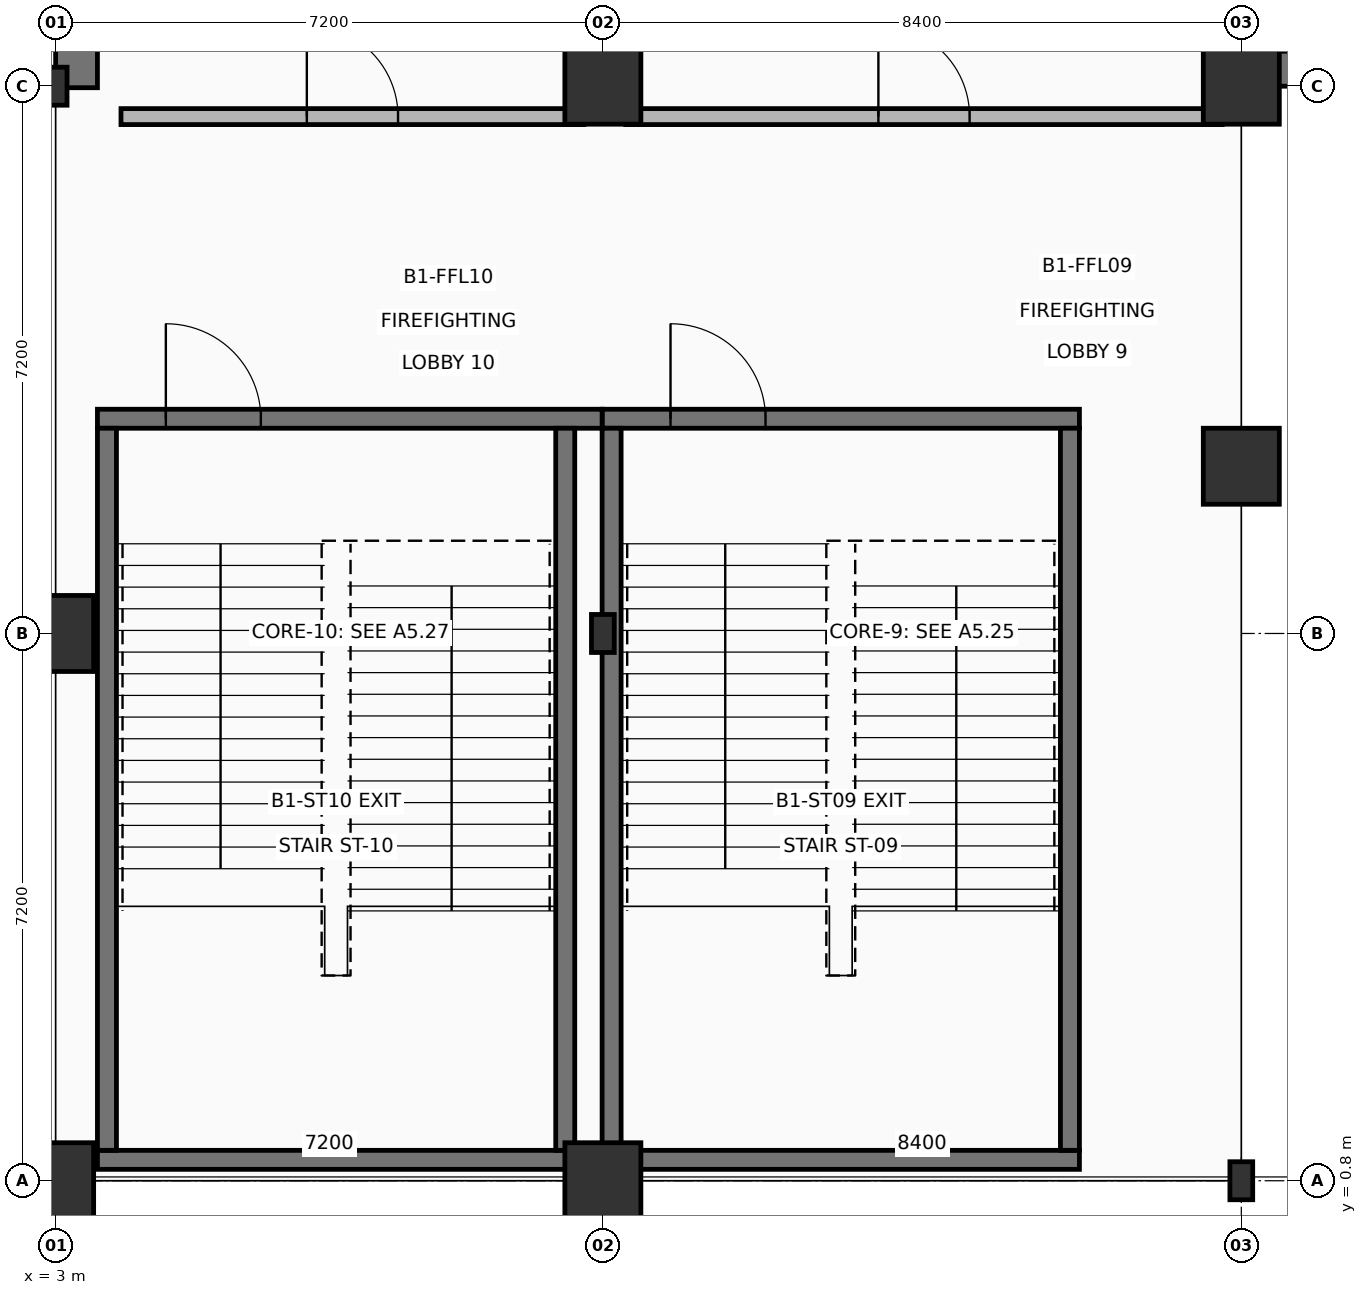
"""IFC4 building model, lengths in metres.
Left out: names, types, materials, properties, quantities, classifications, styles, units other than length and angle.
Written with IfcOpenShell. Run it as: python <this file> out.ifc"""

import sys

from ifc_helpers import new_model, si_unit, direction, frame, frame_2d, origin, origin_2d, place, context, subcontext, project, spatial, rectangle, hollow_rectangle, extrude, element, fill, save


model = new_model("IFC4")
c1 = context("Model", 3, precision=1e-05, world=origin(), true_north=direction((0.0, 1.0)))
c2 = subcontext(c1, "Body", "Model", "MODEL_VIEW")
j1 = project(units=[si_unit("LENGTHUNIT", "METRE"), si_unit("PLANEANGLEUNIT", "RADIAN")], contexts=[c1])
p1 = place(None, origin())
s1 = spatial("IfcSite", under=j1, at=p1, CompositionType="ELEMENT")
p2 = place(p1, origin())
s2 = spatial("IfcBuilding", under=s1, at=p2, CompositionType="ELEMENT")
p3 = place(p2, frame((0.0, 0.0, -5.4)))
s3 = spatial("IfcBuildingStorey", under=s2, at=p3, CompositionType="ELEMENT", Elevation=-5.4)
for number, where, z_axis, x_axis in (
    (1, (3.0, 0.8, 0.0), (0.0, 0.0, 1.0), (1.0, 0.0, 0.0)),
    (2, (3.0, 8.0, 0.0), (0.0, 0.0, 1.0), (1.0, 0.0, 0.0)),
):
    element("IfcColumn", number, at=place(p3, frame(where, z_axis=z_axis, x_axis=x_axis)), inside=s3, PredefinedType="COLUMN", context=c2, shape_type="SweptSolid", body=[
        extrude(rectangle(XDim=1.0, YDim=1.0, at=origin_2d()), origin(), (0.0, 0.0, 1.0), 5.4),
    ])
p4 = place(p3, frame((3.0, 15.2, 0.0), z_axis=(0.0, 0.0, 1.0), x_axis=(1.0, 0.0, 0.0)))
e3 = element("IfcColumn", 3, at=p4, inside=s3, PredefinedType="COLUMN", context=c2, shape_type="SweptSolid", body=[
    extrude(hollow_rectangle(XDim=0.3, YDim=0.5, WallThickness=0.016, at=origin_2d()), origin(), (0.0, 0.0, 1.0), 5.4),
])
p5 = place(p3, frame((10.2, 0.8, 0.0), z_axis=(0.0, 0.0, 1.0), x_axis=(1.0, 0.0, 0.0)))
e4 = element("IfcColumn", 4, at=p5, inside=s3, PredefinedType="COLUMN", context=c2, shape_type="SweptSolid", body=[
    extrude(rectangle(XDim=1.0, YDim=1.0, at=origin_2d()), origin(), (0.0, 0.0, 1.0), 5.4),
])
p6 = place(p3, frame((10.2, 8.0, 0.0), z_axis=(0.0, 0.0, 1.0), x_axis=(1.0, 0.0, 0.0)))
e5 = element("IfcColumn", 5, at=p6, inside=s3, PredefinedType="COLUMN", context=c2, shape_type="SweptSolid", body=[
    extrude(hollow_rectangle(XDim=0.3, YDim=0.5, WallThickness=0.016, at=origin_2d()), origin(), (0.0, 0.0, 1.0), 5.4),
])
p7 = place(p3, frame((10.2, 15.2, 0.0), z_axis=(0.0, 0.0, 1.0), x_axis=(1.0, 0.0, 0.0)))
e6 = element("IfcColumn", 6, at=p7, inside=s3, PredefinedType="COLUMN", context=c2, shape_type="SweptSolid", body=[
    extrude(rectangle(XDim=1.0, YDim=1.0, at=origin_2d()), origin(), (0.0, 0.0, 1.0), 5.4),
])
p8 = place(p3, frame((18.6, 0.8, 0.0), z_axis=(0.0, 0.0, 1.0), x_axis=(1.0, 0.0, 0.0)))
e7 = element("IfcColumn", 7, at=p8, inside=s3, PredefinedType="COLUMN", context=c2, shape_type="SweptSolid", body=[
    extrude(hollow_rectangle(XDim=0.3, YDim=0.5, WallThickness=0.016, at=origin_2d()), origin(), (0.0, 0.0, 1.0), 5.4),
])
p9 = place(p3, frame((18.6, 15.2, 0.0), z_axis=(0.0, 0.0, 1.0), x_axis=(1.0, 0.0, 0.0)))
e8 = element("IfcColumn", 8, at=p9, inside=s3, PredefinedType="COLUMN", context=c2, shape_type="SweptSolid", body=[
    extrude(rectangle(XDim=1.0, YDim=1.0, at=origin_2d()), origin(), (0.0, 0.0, 1.0), 5.4),
])
p10 = place(p3, frame((18.6, 10.2, 0.0), z_axis=(0.0, 0.0, 1.0), x_axis=(1.0, 0.0, 0.0)))
e9 = element("IfcColumn", 9, at=p10, inside=s3, PredefinedType="COLUMN", context=c2, shape_type="SweptSolid", body=[
    extrude(rectangle(XDim=1.0, YDim=1.0, at=origin_2d()), origin(), (0.0, 0.0, 1.0), 5.36),
])
p11 = place(p3, frame((26.515, 15.43, 0.0), z_axis=(0.0, 0.0, 1.0), x_axis=(-1.0, 0.0, 0.0)))
e10 = element("IfcWall", 10, at=p11, inside=s3, PredefinedType="USERDEFINED", context=c2, shape_type="SweptSolid", body=[
    extrude(rectangle(XDim=7.43, YDim=0.46, at=frame_2d((3.715, 0.0))), origin(), (0.0, 0.0, 1.0), 5.12),
])
p12 = place(p3, frame((3.275, 15.18, 0.0), z_axis=(0.0, 0.0, 1.0), x_axis=(0.0, 1.0, 0.0)))
e11 = element("IfcWall", 11, at=p12, inside=s3, PredefinedType="USERDEFINED", context=c2, shape_type="SweptSolid", body=[
    extrude(rectangle(XDim=7.135, YDim=0.55, at=frame_2d((3.567, 0.0))), origin(), (0.0, 0.0, 1.0), 5.12),
])
p13 = place(p3, frame((10.19, 1.075, 0.0), z_axis=(0.0, 0.0, 1.0), x_axis=(1.0, 0.0, 0.0)))
e12 = element("IfcWall", 12, at=p13, inside=s3, PredefinedType="SHEAR", context=c2, shape_type="SweptSolid", body=[
    extrude(rectangle(XDim=6.28, YDim=0.25, at=frame_2d((3.14, 0.0))), origin(), (0.0, 0.0, 1.0), 5.12),
])
p14 = place(p3, frame((10.19, 10.825, 0.0), z_axis=(0.0, 0.0, 1.0), x_axis=(1.0, 0.0, 0.0)))
e13 = element("IfcWall", 13, at=p14, inside=s3, PredefinedType="SHEAR", context=c2, shape_type="SweptSolid", body=[
    extrude(rectangle(XDim=6.28, YDim=0.25, at=frame_2d((3.14, 0.0))), origin(), (0.0, 0.0, 1.0), 5.12),
])
p15 = place(p14, frame((0.9, 0.0, 0.0)))
e14 = element("IfcOpeningElement", 14, at=p15, cuts=e13, PredefinedType="OPENING", context=c2, shape_type="SweptSolid", body=[
    extrude(rectangle(XDim=1.25, YDim=2.2, at=frame_2d((0.625, 1.1))), frame((0.0, 0.135, 0.0), z_axis=(0.0, -1.0, 0.0), x_axis=(1.0, 0.0, 0.0)), (0.0, 0.0, 1.0), 0.27),
])
for number, where, z_axis, x_axis in (
    (15, (10.315, 1.2, 0.0), (0.0, 0.0, 1.0), (0.0, 1.0, 0.0)),
    (16, (16.345, 1.2, 0.0), (0.0, 0.0, 1.0), (0.0, 1.0, 0.0)),
):
    element("IfcWall", number, at=place(p3, frame(where, z_axis=z_axis, x_axis=x_axis)), inside=s3, PredefinedType="SHEAR", context=c2, shape_type="SweptSolid", body=[
        extrude(rectangle(XDim=9.5, YDim=0.25, at=frame_2d((4.75, 0.0))), origin(), (0.0, 0.0, 1.0), 5.12),
    ])
p16 = place(p3, frame((10.5, 14.8, 0.0), z_axis=(0.0, 0.0, 1.0), x_axis=(1.0, 0.0, 0.0)))
e17 = element("IfcWall", 17, at=p16, inside=s3, PredefinedType="PARTITIONING", context=c2, shape_type="SweptSolid", body=[
    extrude(rectangle(XDim=7.85, YDim=0.21, at=frame_2d((3.925, 0.0))), origin(), (0.0, 0.0, 1.0), 5.12),
])
p17 = place(p16, frame((3.325, 0.0, 0.0)))
e18 = element("IfcOpeningElement", 18, at=p17, cuts=e17, PredefinedType="OPENING", context=c2, shape_type="SweptSolid", body=[
    extrude(rectangle(XDim=1.2, YDim=2.2, at=frame_2d((0.6, 1.1))), frame((0.0, 0.115, 0.0), z_axis=(0.0, -1.0, 0.0), x_axis=(1.0, 0.0, 0.0)), (0.0, 0.0, 1.0), 0.23),
])
p18 = place(p3, frame((3.55, 1.075, 0.0), z_axis=(0.0, 0.0, 1.0), x_axis=(1.0, 0.0, 0.0)))
e19 = element("IfcWall", 19, at=p18, inside=s3, PredefinedType="SHEAR", context=c2, shape_type="SweptSolid", body=[
    extrude(rectangle(XDim=6.64, YDim=0.25, at=frame_2d((3.32, 0.0))), origin(), (0.0, 0.0, 1.0), 5.12),
])
p19 = place(p3, frame((3.55, 10.825, 0.0), z_axis=(0.0, 0.0, 1.0), x_axis=(1.0, 0.0, 0.0)))
e20 = element("IfcWall", 20, at=p19, inside=s3, PredefinedType="SHEAR", context=c2, shape_type="SweptSolid", body=[
    extrude(rectangle(XDim=6.64, YDim=0.25, at=frame_2d((3.32, 0.0))), origin(), (0.0, 0.0, 1.0), 5.12),
])
p20 = place(p19, frame((0.9, 0.0, 0.0)))
e21 = element("IfcOpeningElement", 21, at=p20, cuts=e20, PredefinedType="OPENING", context=c2, shape_type="SweptSolid", body=[
    extrude(rectangle(XDim=1.25, YDim=2.2, at=frame_2d((0.625, 1.1))), frame((0.0, 0.135, 0.0), z_axis=(0.0, -1.0, 0.0), x_axis=(1.0, 0.0, 0.0)), (0.0, 0.0, 1.0), 0.27),
])
for number, where, z_axis, x_axis in (
    (22, (3.675, 1.2, 0.0), (0.0, 0.0, 1.0), (0.0, 1.0, 0.0)),
    (23, (9.705, 1.2, 0.0), (0.0, 0.0, 1.0), (0.0, 1.0, 0.0)),
):
    element("IfcWall", number, at=place(p3, frame(where, z_axis=z_axis, x_axis=x_axis)), inside=s3, PredefinedType="SHEAR", context=c2, shape_type="SweptSolid", body=[
        extrude(rectangle(XDim=9.5, YDim=0.25, at=frame_2d((4.75, 0.0))), origin(), (0.0, 0.0, 1.0), 5.12),
    ])
p21 = place(p3, frame((3.86, 14.8, 0.0), z_axis=(0.0, 0.0, 1.0), x_axis=(1.0, 0.0, 0.0)))
e24 = element("IfcWall", 24, at=p21, inside=s3, PredefinedType="PARTITIONING", context=c2, shape_type="SweptSolid", body=[
    extrude(rectangle(XDim=6.09, YDim=0.21, at=frame_2d((3.045, 0.0))), origin(), (0.0, 0.0, 1.0), 4.115),
])
p22 = place(p21, frame((2.445, 0.0, 0.0)))
e25 = element("IfcOpeningElement", 25, at=p22, cuts=e24, PredefinedType="OPENING", context=c2, shape_type="SweptSolid", body=[
    extrude(rectangle(XDim=1.2, YDim=2.2, at=frame_2d((0.6, 1.1))), frame((0.0, 0.115, 0.0), z_axis=(0.0, -1.0, 0.0), x_axis=(1.0, 0.0, 0.0)), (0.0, 0.0, 1.0), 0.23),
])
p23 = place(p15, origin())
e26 = element("IfcDoor", 26, at=p23, inside=s3, OperationType="SINGLE_SWING_LEFT", PredefinedType="DOOR", context=c2, shape_type="SweptSolid", body=[
    extrude(rectangle(XDim=1.25, YDim=2.2, at=frame_2d((0.625, 1.1))), frame((0.0, 0.025, 0.0), z_axis=(0.0, -1.0, 0.0), x_axis=(1.0, 0.0, 0.0)), (0.0, 0.0, 1.0), 0.05),
])
fill(e14, e26)
p24 = place(p17, origin())
e27 = element("IfcDoor", 27, at=p24, inside=s3, OperationType="SINGLE_SWING_LEFT", PredefinedType="DOOR", context=c2, shape_type="SweptSolid", body=[
    extrude(rectangle(XDim=1.2, YDim=2.2, at=frame_2d((0.6, 1.1))), frame((0.0, 0.025, 0.0), z_axis=(0.0, -1.0, 0.0), x_axis=(1.0, 0.0, 0.0)), (0.0, 0.0, 1.0), 0.05),
])
fill(e18, e27)
p25 = place(p20, origin())
e28 = element("IfcDoor", 28, at=p25, inside=s3, OperationType="SINGLE_SWING_LEFT", PredefinedType="DOOR", context=c2, shape_type="SweptSolid", body=[
    extrude(rectangle(XDim=1.25, YDim=2.2, at=frame_2d((0.625, 1.1))), frame((0.0, 0.025, 0.0), z_axis=(0.0, -1.0, 0.0), x_axis=(1.0, 0.0, 0.0)), (0.0, 0.0, 1.0), 0.05),
])
fill(e21, e28)
p26 = place(p22, origin())
e29 = element("IfcDoor", 29, at=p26, inside=s3, OperationType="SINGLE_SWING_LEFT", PredefinedType="DOOR", context=c2, shape_type="SweptSolid", body=[
    extrude(rectangle(XDim=1.2, YDim=2.2, at=frame_2d((0.6, 1.1))), frame((0.0, 0.025, 0.0), z_axis=(0.0, -1.0, 0.0), x_axis=(1.0, 0.0, 0.0)), (0.0, 0.0, 1.0), 0.05),
])
fill(e25, e29)
save(model, sys.argv[1])
